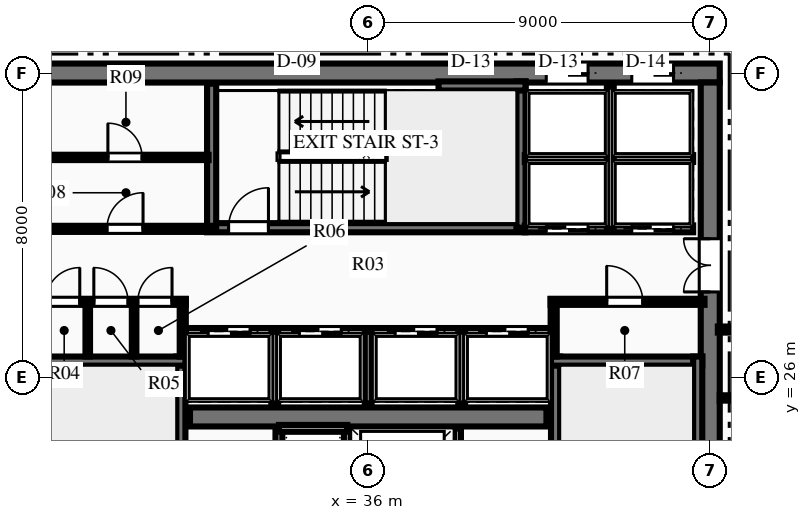
"""IFC4 building model, lengths in metres.
Left out: names, types, materials, properties, quantities, classifications, styles, units other than length and angle.
Written with IfcOpenShell. Run it as: python <this file> out.ifc"""

import sys

from ifc_helpers import new_model, si_unit, direction, frame, frame_2d, origin, place, context, subcontext, project, spatial, rectangle, extrude, element, fill, save


model = new_model("IFC4")
c1 = context("Model", 3, precision=1e-05, world=origin(), true_north=direction((0.0, 1.0)))
c2 = subcontext(c1, "Body", "Model", "MODEL_VIEW")
j1 = project(units=[si_unit("LENGTHUNIT", "METRE"), si_unit("PLANEANGLEUNIT", "RADIAN")], contexts=[c1])
p1 = place(None, origin())
s1 = spatial("IfcSite", under=j1, at=p1, CompositionType="ELEMENT")
p2 = place(p1, origin())
s2 = spatial("IfcBuilding", under=s1, at=p2, CompositionType="ELEMENT")
p3 = place(p2, frame((0.0, 0.0, 163.2)))
s3 = spatial("IfcBuildingStorey", under=s2, at=p3, CompositionType="ELEMENT", Elevation=163.2)
p4 = place(p3, frame((26.75, 34.0, 0.0), z_axis=(0.0, 0.0, 1.0), x_axis=(1.0, 0.0, 0.0)))
e1 = element("IfcWall", 1, at=p4, inside=s3, PredefinedType="SHEAR", context=c2, shape_type="SweptSolid", body=[
    extrude(rectangle(XDim=18.5, YDim=0.5, at=frame_2d((9.25, 0.0))), origin(), (0.0, 0.0, 1.0), 3.75),
])
p5 = place(p4, frame((13.935, 0.0, 0.0)))
e2 = element("IfcOpeningElement", 2, at=p5, cuts=e1, PredefinedType="OPENING", context=c2, shape_type="SweptSolid", body=[
    extrude(rectangle(XDim=1.1, YDim=2.15, at=frame_2d((0.55, 1.075))), frame((0.0, 0.26, 0.0), z_axis=(0.0, -1.0, 0.0), x_axis=(1.0, 0.0, 0.0)), (0.0, 0.0, 1.0), 0.52),
])
p6 = place(p4, frame((16.185, 0.0, 0.0)))
e3 = element("IfcOpeningElement", 3, at=p6, cuts=e1, PredefinedType="OPENING", context=c2, shape_type="SweptSolid", body=[
    extrude(rectangle(XDim=1.1, YDim=2.15, at=frame_2d((0.55, 1.075))), frame((0.0, 0.26, 0.0), z_axis=(0.0, -1.0, 0.0), x_axis=(1.0, 0.0, 0.0)), (0.0, 0.0, 1.0), 0.52),
])
p7 = place(p3, frame((45.0, 18.25, 0.0), z_axis=(0.0, 0.0, 1.0), x_axis=(0.0, 1.0, 0.0)))
e4 = element("IfcWall", 4, at=p7, inside=s3, PredefinedType="SHEAR", context=c2, shape_type="SweptSolid", body=[
    extrude(rectangle(XDim=15.5, YDim=0.5, at=frame_2d((7.75, 0.0))), origin(), (0.0, 0.0, 1.0), 3.75),
])
p8 = place(p7, frame((9.99, 0.0, 0.0)))
e5 = element("IfcOpeningElement", 5, at=p8, cuts=e4, PredefinedType="OPENING", context=c2, shape_type="SweptSolid", body=[
    extrude(rectangle(XDim=1.4, YDim=2.2, at=frame_2d((0.7, 1.1))), frame((0.0, 0.26, 0.0), z_axis=(0.0, -1.0, 0.0), x_axis=(1.0, 0.0, 0.0)), (0.0, 0.0, 1.0), 0.52),
])
p9 = place(p3, frame((31.31, 24.95, 0.0), z_axis=(0.0, 0.0, 1.0), x_axis=(1.0, 0.0, 0.0)))
e6 = element("IfcWall", 6, at=p9, inside=s3, PredefinedType="SHEAR", context=c2, shape_type="SweptSolid", body=[
    extrude(rectangle(XDim=9.38, YDim=0.5, at=frame_2d((4.69, 0.0))), origin(), (0.0, 0.0, 1.0), 3.75),
])
p10 = place(p3, frame((31.07, 18.28, 0.0), z_axis=(0.0, 0.0, 1.0), x_axis=(0.0, 1.0, 0.0)))
e7 = element("IfcWall", 7, at=p10, inside=s3, PredefinedType="SHEAR", context=c2, shape_type="SweptSolid", body=[
    extrude(rectangle(XDim=8.26, YDim=0.24, at=frame_2d((4.13, 0.0))), origin(), (0.0, 0.0, 1.0), 3.75),
])
p11 = place(p10, frame((0.365, 0.0, 0.0)))
e8 = element("IfcOpeningElement", 8, at=p11, cuts=e7, PredefinedType="OPENING", context=c2, shape_type="SweptSolid", body=[
    extrude(rectangle(XDim=1.05, YDim=2.15, at=frame_2d((0.525, 1.075))), frame((0.0, 0.13, 0.0), z_axis=(0.0, -1.0, 0.0), x_axis=(1.0, 0.0, 0.0)), (0.0, 0.0, 1.0), 0.26),
])
p12 = place(p3, frame((27.21, 26.42, 0.0), z_axis=(0.0, 0.0, 1.0), x_axis=(1.0, 0.0, 0.0)))
e9 = element("IfcWall", 9, at=p12, inside=s3, PredefinedType="SHEAR", context=c2, shape_type="SweptSolid", body=[
    extrude(rectangle(XDim=3.98, YDim=0.24, at=frame_2d((1.99, 0.0))), origin(), (0.0, 0.0, 1.0), 3.75),
])
p13 = place(p3, frame((40.93, 18.28, 0.0), z_axis=(0.0, 0.0, 1.0), x_axis=(0.0, 1.0, 0.0)))
e10 = element("IfcWall", 10, at=p13, inside=s3, PredefinedType="SHEAR", context=c2, shape_type="SweptSolid", body=[
    extrude(rectangle(XDim=8.26, YDim=0.24, at=frame_2d((4.13, 0.0))), origin(), (0.0, 0.0, 1.0), 3.75),
])
p14 = place(p13, frame((0.365, 0.0, 0.0)))
e11 = element("IfcOpeningElement", 11, at=p14, cuts=e10, PredefinedType="OPENING", context=c2, shape_type="SweptSolid", body=[
    extrude(rectangle(XDim=1.05, YDim=2.15, at=frame_2d((0.525, 1.075))), frame((0.0, 0.13, 0.0), z_axis=(0.0, -1.0, 0.0), x_axis=(1.0, 0.0, 0.0)), (0.0, 0.0, 1.0), 0.26),
])
p15 = place(p3, frame((40.81, 26.42, 0.0), z_axis=(0.0, 0.0, 1.0), x_axis=(1.0, 0.0, 0.0)))
e12 = element("IfcWall", 12, at=p15, inside=s3, PredefinedType="SHEAR", context=c2, shape_type="SweptSolid", body=[
    extrude(rectangle(XDim=3.98, YDim=0.24, at=frame_2d((1.99, 0.0))), origin(), (0.0, 0.0, 1.0), 3.75),
])
p16 = place(p3, frame((44.67, 18.28, 0.0), z_axis=(0.0, 0.0, 1.0), x_axis=(0.0, 1.0, 0.0)))
e13 = element("IfcWall", 13, at=p16, inside=s3, PredefinedType="SHEAR", context=c2, shape_type="SweptSolid", body=[
    extrude(rectangle(XDim=8.26, YDim=0.24, at=frame_2d((4.13, 0.0))), origin(), (0.0, 0.0, 1.0), 3.75),
])
p17 = place(p3, frame((31.76, 29.93, 0.0), z_axis=(0.0, 0.0, 1.0), x_axis=(1.0, 0.0, 0.0)))
e14 = element("IfcWall", 14, at=p17, inside=s3, PredefinedType="SHEAR", context=c2, shape_type="SweptSolid", body=[
    extrude(rectangle(XDim=8.38, YDim=0.24, at=frame_2d((4.19, 0.0))), origin(), (0.0, 0.0, 1.0), 3.75),
])
p18 = place(p17, frame((0.565, 0.0, 0.0)))
e15 = element("IfcOpeningElement", 15, at=p18, cuts=e14, PredefinedType="OPENING", context=c2, shape_type="SweptSolid", body=[
    extrude(rectangle(XDim=1.05, YDim=2.15, at=frame_2d((0.525, 1.075))), frame((0.0, 0.13, 0.0), z_axis=(0.0, -1.0, 0.0), x_axis=(1.0, 0.0, 0.0)), (0.0, 0.0, 1.0), 0.26),
])
p19 = place(p3, frame((31.88, 29.93, 0.0), z_axis=(0.0, 0.0, 1.0), x_axis=(0.0, 1.0, 0.0)))
e16 = element("IfcWall", 16, at=p19, inside=s3, PredefinedType="SHEAR", context=c2, shape_type="SweptSolid", body=[
    extrude(rectangle(XDim=3.79, YDim=0.24, at=frame_2d((1.895, 0.0))), origin(), (0.0, 0.0, 1.0), 3.75),
])
p20 = place(p3, frame((40.02, 29.93, 0.0), z_axis=(0.0, 0.0, 1.0), x_axis=(0.0, 1.0, 0.0)))
e17 = element("IfcWall", 17, at=p20, inside=s3, PredefinedType="SHEAR", context=c2, shape_type="SweptSolid", body=[
    extrude(rectangle(XDim=3.85, YDim=0.24, at=frame_2d((1.925, 0.0))), origin(), (0.0, 0.0, 1.0), 3.75),
])
p21 = place(p3, frame((37.85, 33.66, 0.0), z_axis=(0.0, 0.0, 1.0), x_axis=(1.0, 0.0, 0.0)))
e18 = element("IfcWall", 18, at=p21, inside=s3, PredefinedType="SHEAR", context=c2, shape_type="SweptSolid", body=[
    extrude(rectangle(XDim=2.29, YDim=0.24, at=frame_2d((1.145, 0.0))), origin(), (0.0, 0.0, 1.0), 3.75),
])
for number, where, z_axis, x_axis in (
    (19, (33.65, 22.05, 0.0), (0.0, 0.0, 1.0), (0.0, 1.0, 0.0)),
    (20, (35.45, 22.05, 0.0), (0.0, 0.0, 1.0), (0.0, 1.0, 0.0)),
):
    element("IfcWall", number, at=place(p3, frame(where, z_axis=z_axis, x_axis=x_axis)), inside=s3, PredefinedType="PARTITIONING", context=c2, shape_type="SweptSolid", body=[
        extrude(rectangle(XDim=2.6, YDim=0.18, at=frame_2d((1.3, 0.0))), origin(), (0.0, 0.0, 1.0), 3.46),
    ])
p22 = place(p3, frame((33.65, 24.65, 0.0), z_axis=(0.0, 0.0, 1.0), x_axis=(1.0, 0.0, 0.0)))
e21 = element("IfcWall", 21, at=p22, inside=s3, PredefinedType="PARTITIONING", context=c2, shape_type="SweptSolid", body=[
    extrude(rectangle(XDim=1.8, YDim=0.18, at=frame_2d((0.9, 0.0))), origin(), (0.0, 0.0, 1.0), 3.46),
])
p23 = place(p3, frame((38.35, 22.05, 0.0), z_axis=(0.0, 0.0, 1.0), x_axis=(0.0, 1.0, 0.0)))
e22 = element("IfcWall", 22, at=p23, inside=s3, PredefinedType="PARTITIONING", context=c2, shape_type="SweptSolid", body=[
    extrude(rectangle(XDim=2.6, YDim=0.18, at=frame_2d((1.3, 0.0))), origin(), (0.0, 0.0, 1.0), 3.46),
])
p24 = place(p3, frame((27.15, 27.98, 0.0), z_axis=(0.0, 0.0, 1.0), x_axis=(1.0, 0.0, 0.0)))
e23 = element("IfcWall", 23, at=p24, inside=s3, PredefinedType="PARTITIONING", context=c2, shape_type="SweptSolid", body=[
    extrude(rectangle(XDim=4.05, YDim=0.16, at=frame_2d((2.025, 0.0))), origin(), (0.0, 0.0, 1.0), 3.46),
])
p25 = place(p24, frame((0.36, 0.0, 0.0)))
e24 = element("IfcOpeningElement", 24, at=p25, cuts=e23, PredefinedType="OPENING", context=c2, shape_type="SweptSolid", body=[
    extrude(rectangle(XDim=0.9, YDim=2.15, at=frame_2d((0.45, 1.075))), frame((0.0, 0.09, 0.0), z_axis=(0.0, -1.0, 0.0), x_axis=(1.0, 0.0, 0.0)), (0.0, 0.0, 1.0), 0.18),
])
p26 = place(p24, frame((1.63, 0.0, 0.0)))
e25 = element("IfcOpeningElement", 25, at=p26, cuts=e23, PredefinedType="OPENING", context=c2, shape_type="SweptSolid", body=[
    extrude(rectangle(XDim=0.9, YDim=2.15, at=frame_2d((0.45, 1.075))), frame((0.0, 0.09, 0.0), z_axis=(0.0, -1.0, 0.0), x_axis=(1.0, 0.0, 0.0)), (0.0, 0.0, 1.0), 0.18),
])
p27 = place(p24, frame((2.788, 0.0, 0.0)))
e26 = element("IfcOpeningElement", 26, at=p27, cuts=e23, PredefinedType="OPENING", context=c2, shape_type="SweptSolid", body=[
    extrude(rectangle(XDim=0.9, YDim=2.15, at=frame_2d((0.45, 1.075))), frame((0.0, 0.09, 0.0), z_axis=(0.0, -1.0, 0.0), x_axis=(1.0, 0.0, 0.0)), (0.0, 0.0, 1.0), 0.18),
])
p28 = place(p3, frame((31.12, 26.54, 0.0), z_axis=(0.0, 0.0, 1.0), x_axis=(0.0, 1.0, 0.0)))
e27 = element("IfcWall", 27, at=p28, inside=s3, PredefinedType="PARTITIONING", context=c2, shape_type="SweptSolid", body=[
    extrude(rectangle(XDim=1.51, YDim=0.16, at=frame_2d((0.755, 0.0))), origin(), (0.0, 0.0, 1.0), 3.46),
])
p29 = place(p3, frame((40.8, 27.98, 0.0), z_axis=(0.0, 0.0, 1.0), x_axis=(1.0, 0.0, 0.0)))
e28 = element("IfcWall", 28, at=p29, inside=s3, PredefinedType="PARTITIONING", context=c2, shape_type="SweptSolid", body=[
    extrude(rectangle(XDim=4.05, YDim=0.16, at=frame_2d((2.025, 0.0))), origin(), (0.0, 0.0, 1.0), 3.46),
])
p30 = place(p29, frame((1.475, 0.0, 0.0)))
e29 = element("IfcOpeningElement", 29, at=p30, cuts=e28, PredefinedType="OPENING", context=c2, shape_type="SweptSolid", body=[
    extrude(rectangle(XDim=0.95, YDim=2.15, at=frame_2d((0.475, 1.075))), frame((0.0, 0.09, 0.0), z_axis=(0.0, -1.0, 0.0), x_axis=(1.0, 0.0, 0.0)), (0.0, 0.0, 1.0), 0.18),
])
p31 = place(p3, frame((40.88, 26.54, 0.0), z_axis=(0.0, 0.0, 1.0), x_axis=(0.0, 1.0, 0.0)))
e30 = element("IfcWall", 30, at=p31, inside=s3, PredefinedType="PARTITIONING", context=c2, shape_type="SweptSolid", body=[
    extrude(rectangle(XDim=1.51, YDim=0.16, at=frame_2d((0.755, 0.0))), origin(), (0.0, 0.0, 1.0), 3.46),
])
for number, where, z_axis, x_axis in (
    (31, (28.62, 26.54, 0.0), (0.0, 0.0, 1.0), (0.0, 1.0, 0.0)),
    (32, (29.84, 26.54, 0.0), (0.0, 0.0, 1.0), (0.0, 1.0, 0.0)),
):
    element("IfcWall", number, at=place(p3, frame(where, z_axis=z_axis, x_axis=x_axis)), inside=s3, PredefinedType="PARTITIONING", context=c2, shape_type="SweptSolid", body=[
        extrude(rectangle(XDim=1.44, YDim=0.12, at=frame_2d((0.72, 0.0))), origin(), (0.0, 0.0, 1.0), 3.46),
    ])
p32 = place(p3, frame((27.45, 29.9, 0.0), z_axis=(0.0, 0.0, 1.0), x_axis=(1.0, 0.0, 0.0)))
e33 = element("IfcWall", 33, at=p32, inside=s3, PredefinedType="PARTITIONING", context=c2, shape_type="SweptSolid", body=[
    extrude(rectangle(XDim=4.43, YDim=0.16, at=frame_2d((2.215, 0.0))), origin(), (0.0, 0.0, 1.0), 3.46),
])
p33 = place(p32, frame((1.675, 0.0, 0.0)))
e34 = element("IfcOpeningElement", 34, at=p33, cuts=e33, PredefinedType="OPENING", context=c2, shape_type="SweptSolid", body=[
    extrude(rectangle(XDim=0.95, YDim=2.15, at=frame_2d((0.475, 1.075))), frame((0.0, 0.09, 0.0), z_axis=(0.0, -1.0, 0.0), x_axis=(1.0, 0.0, 0.0)), (0.0, 0.0, 1.0), 0.18),
])
p34 = place(p3, frame((27.45, 31.78, 0.0), z_axis=(0.0, 0.0, 1.0), x_axis=(1.0, 0.0, 0.0)))
e35 = element("IfcWall", 35, at=p34, inside=s3, PredefinedType="PARTITIONING", context=c2, shape_type="SweptSolid", body=[
    extrude(rectangle(XDim=4.35, YDim=0.14, at=frame_2d((2.175, 0.0))), origin(), (0.0, 0.0, 1.0), 3.46),
])
p35 = place(p34, frame((1.7, 0.0, 0.0)))
e36 = element("IfcOpeningElement", 36, at=p35, cuts=e35, PredefinedType="OPENING", context=c2, shape_type="SweptSolid", body=[
    extrude(rectangle(XDim=0.9, YDim=2.15, at=frame_2d((0.45, 1.075))), frame((0.0, 0.08, 0.0), z_axis=(0.0, -1.0, 0.0), x_axis=(1.0, 0.0, 0.0)), (0.0, 0.0, 1.0), 0.16),
])
p36 = place(p3, frame((40.12, 29.9, 0.0), z_axis=(0.0, 0.0, 1.0), x_axis=(1.0, 0.0, 0.0)))
e37 = element("IfcWall", 37, at=p36, inside=s3, PredefinedType="PARTITIONING", context=c2, shape_type="SweptSolid", body=[
    extrude(rectangle(XDim=4.43, YDim=0.18, at=frame_2d((2.215, 0.0))), origin(), (0.0, 0.0, 1.0), 3.46),
])
p37 = place(p36, frame((0.565, 0.0, 0.0)))
e38 = element("IfcOpeningElement", 38, at=p37, cuts=e37, PredefinedType="OPENING", context=c2, shape_type="SweptSolid", body=[
    extrude(rectangle(XDim=1.1, YDim=2.15, at=frame_2d((0.55, 1.075))), frame((0.0, 0.1, 0.0), z_axis=(0.0, -1.0, 0.0), x_axis=(1.0, 0.0, 0.0)), (0.0, 0.0, 1.0), 0.2),
])
p38 = place(p36, frame((2.815, 0.0, 0.0)))
e39 = element("IfcOpeningElement", 39, at=p38, cuts=e37, PredefinedType="OPENING", context=c2, shape_type="SweptSolid", body=[
    extrude(rectangle(XDim=1.1, YDim=2.15, at=frame_2d((0.55, 1.075))), frame((0.0, 0.1, 0.0), z_axis=(0.0, -1.0, 0.0), x_axis=(1.0, 0.0, 0.0)), (0.0, 0.0, 1.0), 0.2),
])
p39 = place(p3, frame((40.12, 31.75, 0.0), z_axis=(0.0, 0.0, 1.0), x_axis=(1.0, 0.0, 0.0)))
e40 = element("IfcWall", 40, at=p39, inside=s3, PredefinedType="PARTITIONING", context=c2, shape_type="SweptSolid", body=[
    extrude(rectangle(XDim=4.43, YDim=0.18, at=frame_2d((2.215, 0.0))), origin(), (0.0, 0.0, 1.0), 3.46),
])
p40 = place(p3, frame((42.37, 29.9, 0.0), z_axis=(0.0, 0.0, 1.0), x_axis=(0.0, 1.0, 0.0)))
e41 = element("IfcWall", 41, at=p40, inside=s3, PredefinedType="PARTITIONING", context=c2, shape_type="SweptSolid", body=[
    extrude(rectangle(XDim=3.75, YDim=0.18, at=frame_2d((1.875, 0.0))), origin(), (0.0, 0.0, 1.0), 3.46),
])
p41 = place(p3, frame((31.2, 27.2, 0.0), z_axis=(0.0, 0.0, 1.0), x_axis=(1.0, 0.0, 0.0)))
e42 = element("IfcWall", 42, at=p41, inside=s3, PredefinedType="PARTITIONING", context=c2, shape_type="SweptSolid", body=[
    extrude(rectangle(XDim=9.6, YDim=0.18, at=frame_2d((4.8, 0.0))), origin(), (0.0, 0.0, 1.0), 3.46),
])
p42 = place(p41, frame((0.59, 0.0, 0.0)))
e43 = element("IfcOpeningElement", 43, at=p42, cuts=e42, PredefinedType="OPENING", context=c2, shape_type="SweptSolid", body=[
    extrude(rectangle(XDim=1.1, YDim=2.15, at=frame_2d((0.55, 1.075))), frame((0.0, 0.1, 0.0), z_axis=(0.0, -1.0, 0.0), x_axis=(1.0, 0.0, 0.0)), (0.0, 0.0, 1.0), 0.2),
])
p43 = place(p41, frame((2.99, 0.0, 0.0)))
e44 = element("IfcOpeningElement", 44, at=p43, cuts=e42, PredefinedType="OPENING", context=c2, shape_type="SweptSolid", body=[
    extrude(rectangle(XDim=1.1, YDim=2.15, at=frame_2d((0.55, 1.075))), frame((0.0, 0.1, 0.0), z_axis=(0.0, -1.0, 0.0), x_axis=(1.0, 0.0, 0.0)), (0.0, 0.0, 1.0), 0.2),
])
p44 = place(p41, frame((5.51, 0.0, 0.0)))
e45 = element("IfcOpeningElement", 45, at=p44, cuts=e42, PredefinedType="OPENING", context=c2, shape_type="SweptSolid", body=[
    extrude(rectangle(XDim=1.1, YDim=2.15, at=frame_2d((0.55, 1.075))), frame((0.0, 0.1, 0.0), z_axis=(0.0, -1.0, 0.0), x_axis=(1.0, 0.0, 0.0)), (0.0, 0.0, 1.0), 0.2),
])
p45 = place(p41, frame((7.91, 0.0, 0.0)))
e46 = element("IfcOpeningElement", 46, at=p45, cuts=e42, PredefinedType="OPENING", context=c2, shape_type="SweptSolid", body=[
    extrude(rectangle(XDim=1.1, YDim=2.15, at=frame_2d((0.55, 1.075))), frame((0.0, 0.1, 0.0), z_axis=(0.0, -1.0, 0.0), x_axis=(1.0, 0.0, 0.0)), (0.0, 0.0, 1.0), 0.2),
])
for number, where, z_axis, x_axis in (
    (47, (33.54, 25.3, 0.0), (0.0, 0.0, 1.0), (0.0, 1.0, 0.0)),
    (48, (36.0, 25.3, 0.0), (0.0, 0.0, 1.0), (0.0, 1.0, 0.0)),
    (49, (38.46, 25.3, 0.0), (0.0, 0.0, 1.0), (0.0, 1.0, 0.0)),
):
    element("IfcWall", number, at=place(p3, frame(where, z_axis=z_axis, x_axis=x_axis)), inside=s3, PredefinedType="PARTITIONING", context=c2, shape_type="SweptSolid", body=[
        extrude(rectangle(XDim=1.9, YDim=0.18, at=frame_2d((0.95, 0.0))), origin(), (0.0, 0.0, 1.0), 3.46),
    ])
p46 = place(p3, frame((45.2, 27.25, 0.0), z_axis=(0.0, 0.0, 1.0), x_axis=(1.0, 0.0, 0.0)))
e50 = element("IfcWall", 50, at=p46, inside=s3, PredefinedType="PARTITIONING", context=c2, shape_type="SweptSolid", body=[
    extrude(rectangle(XDim=2.25, YDim=0.16, at=frame_2d((1.125, 0.0))), origin(), (0.0, 0.0, 1.0), 3.46),
])
p47 = place(p3, frame((45.25, 25.45, 0.0), z_axis=(0.0, 0.0, 1.0), x_axis=(1.0, 0.0, 0.0)))
e51 = element("IfcWall", 51, at=p47, inside=s3, PredefinedType="PARTITIONING", context=c2, shape_type="SweptSolid", body=[
    extrude(rectangle(XDim=20.721, YDim=0.14, at=frame_2d((10.361, 0.0))), origin(), (0.0, 0.0, 1.0), 3.46),
])
p48 = place(p25, origin())
e52 = element("IfcDoor", 52, at=p48, inside=s3, OperationType="SINGLE_SWING_RIGHT", PredefinedType="DOOR", context=c2, shape_type="SweptSolid", body=[
    extrude(rectangle(XDim=0.9, YDim=2.15, at=frame_2d((0.45, 1.075))), frame((0.0, 0.025, 0.0), z_axis=(0.0, -1.0, 0.0), x_axis=(1.0, 0.0, 0.0)), (0.0, 0.0, 1.0), 0.05),
])
fill(e24, e52)
p49 = place(p26, origin())
e53 = element("IfcDoor", 53, at=p49, inside=s3, OperationType="SINGLE_SWING_LEFT", PredefinedType="DOOR", context=c2, shape_type="SweptSolid", body=[
    extrude(rectangle(XDim=0.9, YDim=2.15, at=frame_2d((0.45, 1.075))), frame((0.0, 0.025, 0.0), z_axis=(0.0, -1.0, 0.0), x_axis=(1.0, 0.0, 0.0)), (0.0, 0.0, 1.0), 0.05),
])
fill(e25, e53)
p50 = place(p27, origin())
e54 = element("IfcDoor", 54, at=p50, inside=s3, OperationType="SINGLE_SWING_RIGHT", PredefinedType="DOOR", context=c2, shape_type="SweptSolid", body=[
    extrude(rectangle(XDim=0.9, YDim=2.15, at=frame_2d((0.45, 1.075))), frame((0.0, 0.025, 0.0), z_axis=(0.0, -1.0, 0.0), x_axis=(1.0, 0.0, 0.0)), (0.0, 0.0, 1.0), 0.05),
])
fill(e26, e54)
p51 = place(p30, origin())
e55 = element("IfcDoor", 55, at=p51, inside=s3, OperationType="SINGLE_SWING_LEFT", PredefinedType="DOOR", context=c2, shape_type="SweptSolid", body=[
    extrude(rectangle(XDim=0.95, YDim=2.15, at=frame_2d((0.475, 1.075))), frame((0.0, 0.025, 0.0), z_axis=(0.0, -1.0, 0.0), x_axis=(1.0, 0.0, 0.0)), (0.0, 0.0, 1.0), 0.05),
])
fill(e29, e55)
p52 = place(p33, origin())
e56 = element("IfcDoor", 56, at=p52, inside=s3, OperationType="SINGLE_SWING_RIGHT", PredefinedType="DOOR", context=c2, shape_type="SweptSolid", body=[
    extrude(rectangle(XDim=0.95, YDim=2.15, at=frame_2d((0.475, 1.075))), frame((0.0, 0.025, 0.0), z_axis=(0.0, -1.0, 0.0), x_axis=(1.0, 0.0, 0.0)), (0.0, 0.0, 1.0), 0.05),
])
fill(e34, e56)
p53 = place(p35, origin())
e57 = element("IfcDoor", 57, at=p53, inside=s3, OperationType="SINGLE_SWING_LEFT", PredefinedType="DOOR", context=c2, shape_type="SweptSolid", body=[
    extrude(rectangle(XDim=0.9, YDim=2.15, at=frame_2d((0.45, 1.075))), frame((0.0, 0.025, 0.0), z_axis=(0.0, -1.0, 0.0), x_axis=(1.0, 0.0, 0.0)), (0.0, 0.0, 1.0), 0.05),
])
fill(e36, e57)
p54 = place(p18, origin())
e58 = element("IfcDoor", 58, at=p54, inside=s3, OperationType="SINGLE_SWING_RIGHT", PredefinedType="DOOR", context=c2, shape_type="SweptSolid", body=[
    extrude(rectangle(XDim=1.05, YDim=2.15, at=frame_2d((0.525, 1.075))), frame((0.0, 0.025, 0.0), z_axis=(0.0, -1.0, 0.0), x_axis=(1.0, 0.0, 0.0)), (0.0, 0.0, 1.0), 0.05),
])
fill(e15, e58)
p55 = place(p8, origin())
e59 = element("IfcDoor", 59, at=p55, inside=s3, OperationType="DOUBLE_DOOR_SINGLE_SWING", PredefinedType="DOOR", context=c2, shape_type="SweptSolid", body=[
    extrude(rectangle(XDim=1.4, YDim=2.2, at=frame_2d((0.7, 1.1))), frame((0.0, 0.025, 0.0), z_axis=(0.0, -1.0, 0.0), x_axis=(1.0, 0.0, 0.0)), (0.0, 0.0, 1.0), 0.05),
])
fill(e5, e59)
p56 = place(p37, origin())
e60 = element("IfcDoor", 60, at=p56, inside=s3, OperationType="SLIDING_TO_LEFT", PredefinedType="DOOR", context=c2, shape_type="SweptSolid", body=[
    extrude(rectangle(XDim=1.1, YDim=2.15, at=frame_2d((0.55, 1.075))), frame((0.0, 0.025, 0.0), z_axis=(0.0, -1.0, 0.0), x_axis=(1.0, 0.0, 0.0)), (0.0, 0.0, 1.0), 0.05),
])
fill(e38, e60)
p57 = place(p38, origin())
e61 = element("IfcDoor", 61, at=p57, inside=s3, OperationType="SLIDING_TO_LEFT", PredefinedType="DOOR", context=c2, shape_type="SweptSolid", body=[
    extrude(rectangle(XDim=1.1, YDim=2.15, at=frame_2d((0.55, 1.075))), frame((0.0, 0.025, 0.0), z_axis=(0.0, -1.0, 0.0), x_axis=(1.0, 0.0, 0.0)), (0.0, 0.0, 1.0), 0.05),
])
fill(e39, e61)
p58 = place(p5, origin())
e62 = element("IfcDoor", 62, at=p58, inside=s3, OperationType="SLIDING_TO_LEFT", PredefinedType="DOOR", context=c2, shape_type="SweptSolid", body=[
    extrude(rectangle(XDim=1.1, YDim=2.15, at=frame_2d((0.55, 1.075))), frame((0.0, 0.025, 0.0), z_axis=(0.0, -1.0, 0.0), x_axis=(1.0, 0.0, 0.0)), (0.0, 0.0, 1.0), 0.05),
])
fill(e2, e62)
p59 = place(p6, origin())
e63 = element("IfcDoor", 63, at=p59, inside=s3, OperationType="SLIDING_TO_LEFT", PredefinedType="DOOR", context=c2, shape_type="SweptSolid", body=[
    extrude(rectangle(XDim=1.1, YDim=2.15, at=frame_2d((0.55, 1.075))), frame((0.0, 0.025, 0.0), z_axis=(0.0, -1.0, 0.0), x_axis=(1.0, 0.0, 0.0)), (0.0, 0.0, 1.0), 0.05),
])
fill(e3, e63)
p60 = place(p42, origin())
e64 = element("IfcDoor", 64, at=p60, inside=s3, OperationType="SLIDING_TO_LEFT", PredefinedType="DOOR", context=c2, shape_type="SweptSolid", body=[
    extrude(rectangle(XDim=1.1, YDim=2.15, at=frame_2d((0.55, 1.075))), frame((0.0, 0.025, 0.0), z_axis=(0.0, -1.0, 0.0), x_axis=(1.0, 0.0, 0.0)), (0.0, 0.0, 1.0), 0.05),
])
fill(e43, e64)
p61 = place(p43, origin())
e65 = element("IfcDoor", 65, at=p61, inside=s3, OperationType="SLIDING_TO_LEFT", PredefinedType="DOOR", context=c2, shape_type="SweptSolid", body=[
    extrude(rectangle(XDim=1.1, YDim=2.15, at=frame_2d((0.55, 1.075))), frame((0.0, 0.025, 0.0), z_axis=(0.0, -1.0, 0.0), x_axis=(1.0, 0.0, 0.0)), (0.0, 0.0, 1.0), 0.05),
])
fill(e44, e65)
p62 = place(p44, origin())
e66 = element("IfcDoor", 66, at=p62, inside=s3, OperationType="SLIDING_TO_LEFT", PredefinedType="DOOR", context=c2, shape_type="SweptSolid", body=[
    extrude(rectangle(XDim=1.1, YDim=2.15, at=frame_2d((0.55, 1.075))), frame((0.0, 0.025, 0.0), z_axis=(0.0, -1.0, 0.0), x_axis=(1.0, 0.0, 0.0)), (0.0, 0.0, 1.0), 0.05),
])
fill(e45, e66)
p63 = place(p45, origin())
e67 = element("IfcDoor", 67, at=p63, inside=s3, OperationType="SLIDING_TO_LEFT", PredefinedType="DOOR", context=c2, shape_type="SweptSolid", body=[
    extrude(rectangle(XDim=1.1, YDim=2.15, at=frame_2d((0.55, 1.075))), frame((0.0, 0.025, 0.0), z_axis=(0.0, -1.0, 0.0), x_axis=(1.0, 0.0, 0.0)), (0.0, 0.0, 1.0), 0.05),
])
fill(e46, e67)
save(model, sys.argv[1])
